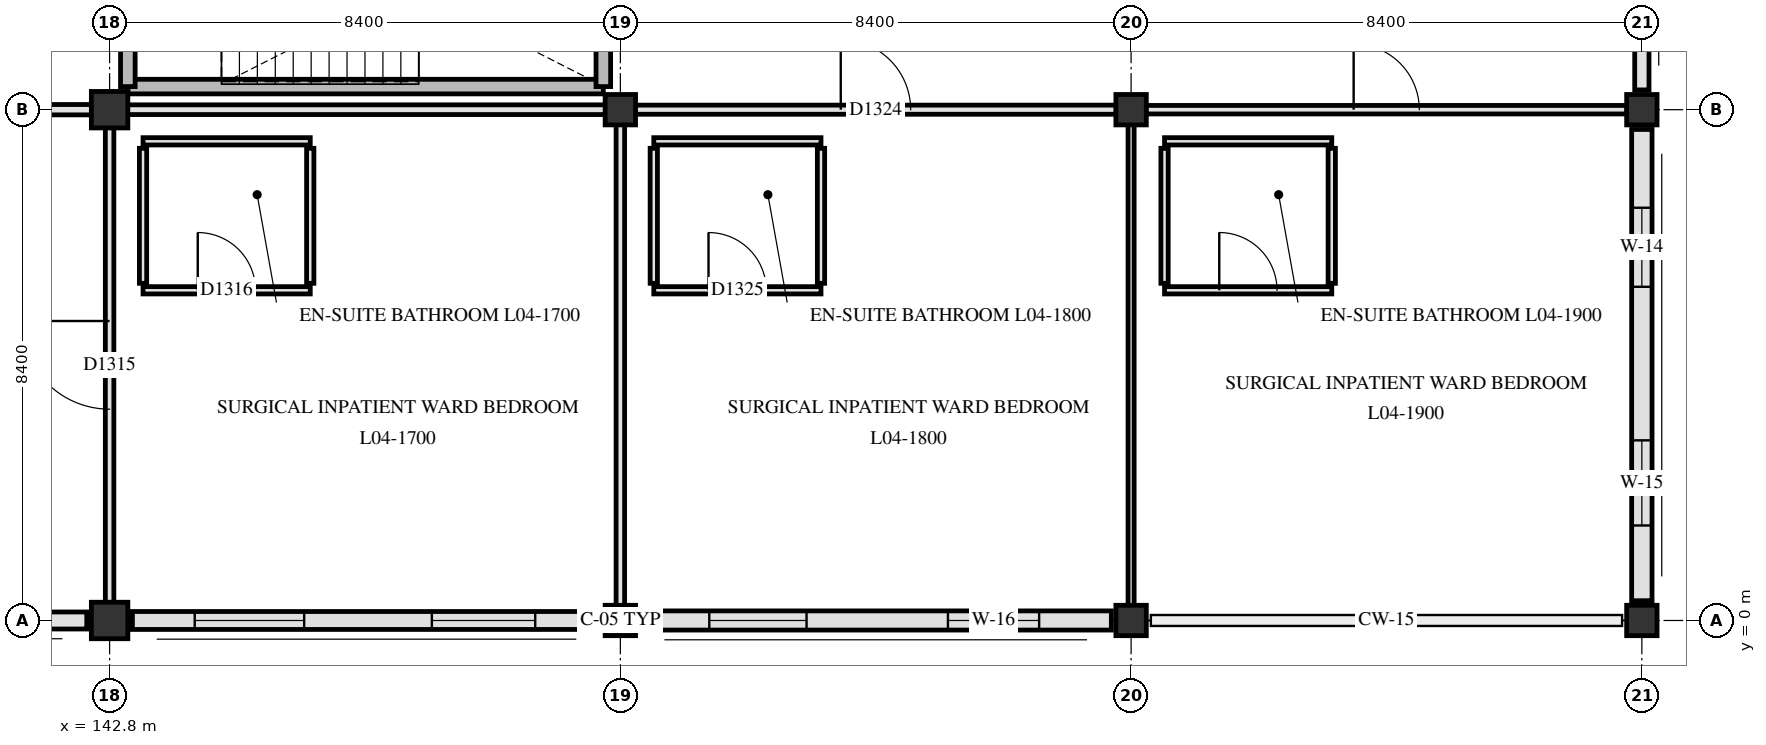
"""IFC4 building model, lengths in metres.
Left out: names, types, materials, properties, quantities, classifications, styles, units other than length and angle.
Written with IfcOpenShell. Run it as: python <this file> out.ifc"""

import sys

from ifc_helpers import new_model, si_unit, direction, frame, frame_2d, origin, origin_2d, place, context, subcontext, project, spatial, rectangle, extrude, element, fill, save


model = new_model("IFC4")
c1 = context("Model", 3, precision=1e-05, world=origin(), true_north=direction((0.0, 1.0)))
c2 = subcontext(c1, "Body", "Model", "MODEL_VIEW")
j1 = project(units=[si_unit("LENGTHUNIT", "METRE"), si_unit("PLANEANGLEUNIT", "RADIAN")], contexts=[c1])
p1 = place(None, origin())
s1 = spatial("IfcSite", under=j1, at=p1, CompositionType="ELEMENT")
p2 = place(p1, origin())
s2 = spatial("IfcBuilding", under=s1, at=p2, CompositionType="ELEMENT")
p3 = place(p2, frame((0.0, 0.0, 18.6)))
s3 = spatial("IfcBuildingStorey", under=s2, at=p3, CompositionType="ELEMENT", Elevation=18.6)
for number, where, z_axis, x_axis in (
    (1, (142.8, 0.0, 0.0), (0.0, 0.0, 1.0), (1.0, 0.0, 0.0)),
    (2, (142.8, 8.4, 0.0), (0.0, 0.0, 1.0), (1.0, 0.0, 0.0)),
):
    element("IfcColumn", number, at=place(p3, frame(where, z_axis=z_axis, x_axis=x_axis)), inside=s3, PredefinedType="COLUMN", context=c2, shape_type="SweptSolid", body=[
        extrude(rectangle(XDim=0.6, YDim=0.6, at=origin_2d()), origin(), (0.0, 0.0, 1.0), 3.9),
    ])
for number, where, z_axis, x_axis in (
    (3, (151.2, 0.0, 0.0), (0.0, 0.0, 1.0), (1.0, 0.0, 0.0)),
    (4, (151.2, 8.4, 0.0), (0.0, 0.0, 1.0), (1.0, 0.0, 0.0)),
    (5, (159.6, 0.0, 0.0), (0.0, 0.0, 1.0), (1.0, 0.0, 0.0)),
    (6, (159.6, 8.4, 0.0), (0.0, 0.0, 1.0), (1.0, 0.0, 0.0)),
    (7, (168.0, 0.0, 0.0), (0.0, 0.0, 1.0), (1.0, 0.0, 0.0)),
    (8, (168.0, 8.4, 0.0), (0.0, 0.0, 1.0), (1.0, 0.0, 0.0)),
):
    element("IfcColumn", number, at=place(p3, frame(where, z_axis=z_axis, x_axis=x_axis)), inside=s3, PredefinedType="COLUMN", context=c2, shape_type="SweptSolid", body=[
        extrude(rectangle(XDim=0.5, YDim=0.5, at=origin_2d()), origin(), (0.0, 0.0, 1.0), 3.9),
    ])
p4 = place(p3, frame((168.0, 16.475, 0.0), z_axis=(0.0, 0.0, 1.0), x_axis=(0.0, -1.0, 0.0)))
e9 = element("IfcWall", 9, at=p4, inside=s3, PredefinedType="SOLIDWALL", context=c2, shape_type="SweptSolid", body=[
    extrude(rectangle(XDim=7.75, YDim=0.235, at=frame_2d((3.875, 0.0))), origin(), (0.0, 0.0, 1.0), 3.37),
])
p5 = place(p4, frame((1.387, 0.0, 0.85)))
e10 = element("IfcOpeningElement", 10, at=p5, cuts=e9, PredefinedType="OPENING", context=c2, shape_type="SweptSolid", body=[
    extrude(rectangle(XDim=1.1, YDim=1.42, at=frame_2d((0.55, 0.71))), frame((0.0, 0.127, 0.0), z_axis=(0.0, -1.0, 0.0), x_axis=(1.0, 0.0, 0.0)), (0.0, 0.0, 1.0), 0.255),
])
p6 = place(p4, frame((5.212, 0.0, 0.85)))
e11 = element("IfcOpeningElement", 11, at=p6, cuts=e9, PredefinedType="OPENING", context=c2, shape_type="SweptSolid", body=[
    extrude(rectangle(XDim=1.2, YDim=1.42, at=frame_2d((0.6, 0.71))), frame((0.0, 0.127, 0.0), z_axis=(0.0, -1.0, 0.0), x_axis=(1.0, 0.0, 0.0)), (0.0, 0.0, 1.0), 0.255),
])
p7 = place(p3, frame((168.0, 8.075, 0.0), z_axis=(0.0, 0.0, 1.0), x_axis=(0.0, -1.0, 0.0)))
e12 = element("IfcWall", 12, at=p7, inside=s3, PredefinedType="SOLIDWALL", context=c2, shape_type="SweptSolid", body=[
    extrude(rectangle(XDim=7.75, YDim=0.335, at=frame_2d((3.875, 0.0))), origin(), (0.0, 0.0, 1.0), 3.3),
])
p8 = place(p7, frame((1.288, 0.0, 0.85)))
e13 = element("IfcOpeningElement", 13, at=p8, cuts=e12, PredefinedType="OPENING", context=c2, shape_type="SweptSolid", body=[
    extrude(rectangle(XDim=1.3, YDim=1.42, at=frame_2d((0.65, 0.71))), frame((0.0, 0.177, 0.0), z_axis=(0.0, -1.0, 0.0), x_axis=(1.0, 0.0, 0.0)), (0.0, 0.0, 1.0), 0.355),
])
p9 = place(p7, frame((5.113, 0.0, 0.85)))
e14 = element("IfcOpeningElement", 14, at=p9, cuts=e12, PredefinedType="OPENING", context=c2, shape_type="SweptSolid", body=[
    extrude(rectangle(XDim=1.4, YDim=1.42, at=frame_2d((0.7, 0.71))), frame((0.0, 0.177, 0.0), z_axis=(0.0, -1.0, 0.0), x_axis=(1.0, 0.0, 0.0)), (0.0, 0.0, 1.0), 0.355),
])
p10 = place(p3, frame((159.275, 0.0, 0.0), z_axis=(0.0, 0.0, 1.0), x_axis=(-1.0, 0.0, 0.0)))
e15 = element("IfcWall", 15, at=p10, inside=s3, PredefinedType="SOLIDWALL", context=c2, shape_type="SweptSolid", body=[
    extrude(rectangle(XDim=7.75, YDim=0.315, at=frame_2d((3.875, 0.0))), origin(), (0.0, 0.0, 1.0), 3.3),
])
p11 = place(p10, frame((1.188, 0.0, 0.85)))
e16 = element("IfcOpeningElement", 16, at=p11, cuts=e15, PredefinedType="OPENING", context=c2, shape_type="SweptSolid", body=[
    extrude(rectangle(XDim=1.5, YDim=1.42, at=frame_2d((0.75, 0.71))), frame((0.0, 0.167, 0.0), z_axis=(0.0, -1.0, 0.0), x_axis=(1.0, 0.0, 0.0)), (0.0, 0.0, 1.0), 0.335),
])
p12 = place(p10, frame((5.012, 0.0, 0.85)))
e17 = element("IfcOpeningElement", 17, at=p12, cuts=e15, PredefinedType="OPENING", context=c2, shape_type="SweptSolid", body=[
    extrude(rectangle(XDim=1.6, YDim=1.42, at=frame_2d((0.8, 0.71))), frame((0.0, 0.167, 0.0), z_axis=(0.0, -1.0, 0.0), x_axis=(1.0, 0.0, 0.0)), (0.0, 0.0, 1.0), 0.335),
])
p13 = place(p3, frame((150.875, 0.0, 0.0), z_axis=(0.0, 0.0, 1.0), x_axis=(-1.0, 0.0, 0.0)))
e18 = element("IfcWall", 18, at=p13, inside=s3, PredefinedType="SOLIDWALL", context=c2, shape_type="SweptSolid", body=[
    extrude(rectangle(XDim=7.7, YDim=0.295, at=frame_2d((3.85, 0.0))), origin(), (0.0, 0.0, 1.0), 3.31),
])
p14 = place(p13, frame((1.075, 0.0, 0.85)))
e19 = element("IfcOpeningElement", 19, at=p14, cuts=e18, PredefinedType="OPENING", context=c2, shape_type="SweptSolid", body=[
    extrude(rectangle(XDim=1.7, YDim=1.42, at=frame_2d((0.85, 0.71))), frame((0.0, 0.157, 0.0), z_axis=(0.0, -1.0, 0.0), x_axis=(1.0, 0.0, 0.0)), (0.0, 0.0, 1.0), 0.315),
])
p15 = place(p13, frame((4.875, 0.0, 0.85)))
e20 = element("IfcOpeningElement", 20, at=p15, cuts=e18, PredefinedType="OPENING", context=c2, shape_type="SweptSolid", body=[
    extrude(rectangle(XDim=1.8, YDim=1.42, at=frame_2d((0.9, 0.71))), frame((0.0, 0.157, 0.0), z_axis=(0.0, -1.0, 0.0), x_axis=(1.0, 0.0, 0.0)), (0.0, 0.0, 1.0), 0.315),
])
p16 = place(p3, frame((142.425, 0.0, 0.0), z_axis=(0.0, 0.0, 1.0), x_axis=(-1.0, 0.0, 0.0)))
e21 = element("IfcWall", 21, at=p16, inside=s3, PredefinedType="SOLIDWALL", context=c2, shape_type="SweptSolid", body=[
    extrude(rectangle(XDim=7.65, YDim=0.28, at=frame_2d((3.825, 0.0))), origin(), (0.0, 0.0, 1.0), 3.31),
])
p17 = place(p16, frame((0.962, 0.0, 0.85)))
e22 = element("IfcOpeningElement", 22, at=p17, cuts=e21, PredefinedType="OPENING", context=c2, shape_type="SweptSolid", body=[
    extrude(rectangle(XDim=1.9, YDim=1.42, at=frame_2d((0.95, 0.71))), frame((0.0, 0.15, 0.0), z_axis=(0.0, -1.0, 0.0), x_axis=(1.0, 0.0, 0.0)), (0.0, 0.0, 1.0), 0.3),
])
p18 = place(p16, frame((5.212, 0.0, 0.85)))
e23 = element("IfcOpeningElement", 23, at=p18, cuts=e21, PredefinedType="OPENING", context=c2, shape_type="SweptSolid", body=[
    extrude(rectangle(XDim=1.05, YDim=1.54, at=frame_2d((0.525, 0.77))), frame((0.0, 0.15, 0.0), z_axis=(0.0, -1.0, 0.0), x_axis=(1.0, 0.0, 0.0)), (0.0, 0.0, 1.0), 0.3),
])
p19 = place(p3, frame((143.1, 8.78, 0.0), z_axis=(0.0, 0.0, 1.0), x_axis=(1.0, 0.0, 0.0)))
e24 = element("IfcWall", 24, at=p19, inside=s3, PredefinedType="SHEAR", context=c2, shape_type="SweptSolid", body=[
    extrude(rectangle(XDim=7.82, YDim=0.24, at=frame_2d((3.91, 0.0))), origin(), (0.0, 0.0, 1.0), 3.62),
])
for number, where, z_axis, x_axis in (
    (25, (143.1, 8.78, 0.0), (0.0, 0.0, 1.0), (0.0, 1.0, 0.0)),
    (26, (150.92, 8.78, 0.0), (0.0, 0.0, 1.0), (0.0, 1.0, 0.0)),
):
    element("IfcWall", number, at=place(p3, frame(where, z_axis=z_axis, x_axis=x_axis)), inside=s3, PredefinedType="SHEAR", context=c2, shape_type="SweptSolid", body=[
        extrude(rectangle(XDim=3.32, YDim=0.24, at=frame_2d((1.66, 0.0))), origin(), (0.0, 0.0, 1.0), 3.62),
    ])
p20 = place(p3, frame((143.35, 5.43, 0.0), z_axis=(0.0, 0.0, 1.0), x_axis=(1.0, 0.0, 0.0)))
e27 = element("IfcWall", 27, at=p20, inside=s3, PredefinedType="PARTITIONING", context=c2, shape_type="SweptSolid", body=[
    extrude(rectangle(XDim=2.75, YDim=0.12, at=frame_2d((1.375, 0.0))), origin(), (0.0, 0.0, 1.0), 3.61),
])
p21 = place(p20, frame((0.9, 0.0, 0.0)))
e28 = element("IfcOpeningElement", 28, at=p21, cuts=e27, PredefinedType="OPENING", context=c2, shape_type="SweptSolid", body=[
    extrude(rectangle(XDim=0.95, YDim=2.1, at=frame_2d((0.475, 1.05))), frame((0.0, 0.07, 0.0), z_axis=(0.0, -1.0, 0.0), x_axis=(1.0, 0.0, 0.0)), (0.0, 0.0, 1.0), 0.14),
])
p22 = place(p3, frame((151.75, 5.43, 0.0), z_axis=(0.0, 0.0, 1.0), x_axis=(1.0, 0.0, 0.0)))
e29 = element("IfcWall", 29, at=p22, inside=s3, PredefinedType="PARTITIONING", context=c2, shape_type="SweptSolid", body=[
    extrude(rectangle(XDim=2.75, YDim=0.12, at=frame_2d((1.375, 0.0))), origin(), (0.0, 0.0, 1.0), 3.61),
])
p23 = place(p22, frame((0.9, 0.0, 0.0)))
e30 = element("IfcOpeningElement", 30, at=p23, cuts=e29, PredefinedType="OPENING", context=c2, shape_type="SweptSolid", body=[
    extrude(rectangle(XDim=0.95, YDim=2.1, at=frame_2d((0.475, 1.05))), frame((0.0, 0.07, 0.0), z_axis=(0.0, -1.0, 0.0), x_axis=(1.0, 0.0, 0.0)), (0.0, 0.0, 1.0), 0.14),
])
p24 = place(p3, frame((160.15, 5.43, 0.0), z_axis=(0.0, 0.0, 1.0), x_axis=(1.0, 0.0, 0.0)))
e31 = element("IfcWall", 31, at=p24, inside=s3, PredefinedType="PARTITIONING", context=c2, shape_type="SweptSolid", body=[
    extrude(rectangle(XDim=2.75, YDim=0.12, at=frame_2d((1.375, 0.0))), origin(), (0.0, 0.0, 1.0), 3.61),
])
p25 = place(p24, frame((0.9, 0.0, 0.0)))
e32 = element("IfcOpeningElement", 32, at=p25, cuts=e31, PredefinedType="OPENING", context=c2, shape_type="SweptSolid", body=[
    extrude(rectangle(XDim=0.95, YDim=2.1, at=frame_2d((0.475, 1.05))), frame((0.0, 0.07, 0.0), z_axis=(0.0, -1.0, 0.0), x_axis=(1.0, 0.0, 0.0)), (0.0, 0.0, 1.0), 0.14),
])
for number, where, z_axis, x_axis in (
    (33, (143.35, 7.88, 0.0), (0.0, 0.0, 1.0), (1.0, 0.0, 0.0)),
    (34, (151.75, 7.88, 0.0), (0.0, 0.0, 1.0), (1.0, 0.0, 0.0)),
    (35, (160.15, 7.88, 0.0), (0.0, 0.0, 1.0), (1.0, 0.0, 0.0)),
):
    element("IfcWall", number, at=place(p3, frame(where, z_axis=z_axis, x_axis=x_axis)), inside=s3, PredefinedType="PARTITIONING", context=c2, shape_type="SweptSolid", body=[
        extrude(rectangle(XDim=2.75, YDim=0.12, at=frame_2d((1.375, 0.0))), origin(), (0.0, 0.0, 1.0), 3.61),
    ])
p26 = place(p3, frame((137.0, 8.4, 0.0), z_axis=(0.0, 0.0, 1.0), x_axis=(1.0, 0.0, 0.0)))
e36 = element("IfcWall", 36, at=p26, inside=s3, PredefinedType="PARTITIONING", context=c2, shape_type="SweptSolid", body=[
    extrude(rectangle(XDim=5.505, YDim=0.17, at=frame_2d((2.752, 0.0))), origin(), (0.0, 0.0, 1.0), 3.16),
])
p27 = place(p26, frame((2.113, 0.0, 0.0)))
e37 = element("IfcOpeningElement", 37, at=p27, cuts=e36, PredefinedType="OPENING", context=c2, shape_type="SweptSolid", body=[
    extrude(rectangle(XDim=1.28, YDim=2.18, at=frame_2d((0.64, 1.09))), frame((0.0, 0.095, 0.0), z_axis=(0.0, -1.0, 0.0), x_axis=(1.0, 0.0, 0.0)), (0.0, 0.0, 1.0), 0.19),
])
p28 = place(p3, frame((143.095, 8.4, 0.0), z_axis=(0.0, 0.0, 1.0), x_axis=(1.0, 0.0, 0.0)))
e38 = element("IfcWall", 38, at=p28, inside=s3, PredefinedType="PARTITIONING", context=c2, shape_type="SweptSolid", body=[
    extrude(rectangle(XDim=7.86, YDim=0.16, at=frame_2d((3.93, 0.0))), origin(), (0.0, 0.0, 1.0), 3.16),
])
p29 = place(p3, frame((151.445, 8.4, 0.0), z_axis=(0.0, 0.0, 1.0), x_axis=(1.0, 0.0, 0.0)))
e39 = element("IfcWall", 39, at=p29, inside=s3, PredefinedType="PARTITIONING", context=c2, shape_type="SweptSolid", body=[
    extrude(rectangle(XDim=7.91, YDim=0.15, at=frame_2d((3.955, 0.0))), origin(), (0.0, 0.0, 1.0), 3.15),
])
p30 = place(p29, frame((3.38, 0.0, 0.0)))
e40 = element("IfcOpeningElement", 40, at=p30, cuts=e39, PredefinedType="OPENING", context=c2, shape_type="SweptSolid", body=[
    extrude(rectangle(XDim=1.15, YDim=2.15, at=frame_2d((0.575, 1.075))), frame((0.0, 0.085, 0.0), z_axis=(0.0, -1.0, 0.0), x_axis=(1.0, 0.0, 0.0)), (0.0, 0.0, 1.0), 0.17),
])
p31 = place(p3, frame((159.845, 8.4, 0.0), z_axis=(0.0, 0.0, 1.0), x_axis=(1.0, 0.0, 0.0)))
e41 = element("IfcWall", 41, at=p31, inside=s3, PredefinedType="PARTITIONING", context=c2, shape_type="SweptSolid", body=[
    extrude(rectangle(XDim=7.91, YDim=0.14, at=frame_2d((3.955, 0.0))), origin(), (0.0, 0.0, 1.0), 3.15),
])
p32 = place(p31, frame((3.415, 0.0, 0.0)))
e42 = element("IfcOpeningElement", 42, at=p32, cuts=e41, PredefinedType="OPENING", context=c2, shape_type="SweptSolid", body=[
    extrude(rectangle(XDim=1.08, YDim=2.12, at=frame_2d((0.54, 1.06))), frame((0.0, 0.08, 0.0), z_axis=(0.0, -1.0, 0.0), x_axis=(1.0, 0.0, 0.0)), (0.0, 0.0, 1.0), 0.16),
])
p33 = place(p3, frame((142.8, 0.295, 0.0), z_axis=(0.0, 0.0, 1.0), x_axis=(0.0, 1.0, 0.0)))
e43 = element("IfcWall", 43, at=p33, inside=s3, PredefinedType="PARTITIONING", context=c2, shape_type="SweptSolid", body=[
    extrude(rectangle(XDim=7.81, YDim=0.14, at=frame_2d((3.905, 0.0))), origin(), (0.0, 0.0, 1.0), 3.26),
])
p34 = place(p33, frame((3.18, 0.0, 0.0)))
e44 = element("IfcOpeningElement", 44, at=p34, cuts=e43, PredefinedType="OPENING", context=c2, shape_type="SweptSolid", body=[
    extrude(rectangle(XDim=1.45, YDim=2.2, at=frame_2d((0.725, 1.1))), frame((0.0, 0.08, 0.0), z_axis=(0.0, -1.0, 0.0), x_axis=(1.0, 0.0, 0.0)), (0.0, 0.0, 1.0), 0.16),
])
for number, where, z_axis, x_axis in (
    (45, (143.35, 5.545, 0.0), (0.0, 0.0, 1.0), (0.0, 1.0, 0.0)),
    (46, (146.1, 5.545, 0.0), (0.0, 0.0, 1.0), (0.0, 1.0, 0.0)),
):
    element("IfcWall", number, at=place(p3, frame(where, z_axis=z_axis, x_axis=x_axis)), inside=s3, PredefinedType="PARTITIONING", context=c2, shape_type="SweptSolid", body=[
        extrude(rectangle(XDim=2.22, YDim=0.12, at=frame_2d((1.11, 0.0))), origin(), (0.0, 0.0, 1.0), 3.31),
    ])
p35 = place(p3, frame((151.2, 0.245, 0.0), z_axis=(0.0, 0.0, 1.0), x_axis=(0.0, 1.0, 0.0)))
e47 = element("IfcWall", 47, at=p35, inside=s3, PredefinedType="PARTITIONING", context=c2, shape_type="SweptSolid", body=[
    extrude(rectangle(XDim=7.91, YDim=0.14, at=frame_2d((3.955, 0.0))), origin(), (0.0, 0.0, 1.0), 3.25),
])
for number, where, z_axis, x_axis in (
    (48, (151.75, 5.545, 0.0), (0.0, 0.0, 1.0), (0.0, 1.0, 0.0)),
    (49, (154.5, 5.545, 0.0), (0.0, 0.0, 1.0), (0.0, 1.0, 0.0)),
):
    element("IfcWall", number, at=place(p3, frame(where, z_axis=z_axis, x_axis=x_axis)), inside=s3, PredefinedType="PARTITIONING", context=c2, shape_type="SweptSolid", body=[
        extrude(rectangle(XDim=2.22, YDim=0.12, at=frame_2d((1.11, 0.0))), origin(), (0.0, 0.0, 1.0), 3.3),
    ])
p36 = place(p3, frame((159.6, 0.245, 0.0), z_axis=(0.0, 0.0, 1.0), x_axis=(0.0, 1.0, 0.0)))
e50 = element("IfcWall", 50, at=p36, inside=s3, PredefinedType="PARTITIONING", context=c2, shape_type="SweptSolid", body=[
    extrude(rectangle(XDim=7.91, YDim=0.1, at=frame_2d((3.955, 0.0))), origin(), (0.0, 0.0, 1.0), 3.25),
])
for number, where, z_axis, x_axis in (
    (51, (160.15, 5.545, 0.0), (0.0, 0.0, 1.0), (0.0, 1.0, 0.0)),
    (52, (162.9, 5.545, 0.0), (0.0, 0.0, 1.0), (0.0, 1.0, 0.0)),
):
    element("IfcWall", number, at=place(p3, frame(where, z_axis=z_axis, x_axis=x_axis)), inside=s3, PredefinedType="PARTITIONING", context=c2, shape_type="SweptSolid", body=[
        extrude(rectangle(XDim=2.22, YDim=0.12, at=frame_2d((1.11, 0.0))), origin(), (0.0, 0.0, 1.0), 3.3),
    ])
p37 = place(p8, origin())
e53 = element("IfcWindow", 53, at=p37, inside=s3, PartitioningType="SINGLE_PANEL", PredefinedType="WINDOW", context=c2, shape_type="SweptSolid", body=[
    extrude(rectangle(XDim=1.3, YDim=1.42, at=frame_2d((0.65, 0.71))), frame((0.0, 0.03, 0.0), z_axis=(0.0, -1.0, 0.0), x_axis=(1.0, 0.0, 0.0)), (0.0, 0.0, 1.0), 0.06),
])
fill(e13, e53)
p38 = place(p9, origin())
e54 = element("IfcWindow", 54, at=p38, inside=s3, PartitioningType="SINGLE_PANEL", PredefinedType="WINDOW", context=c2, shape_type="SweptSolid", body=[
    extrude(rectangle(XDim=1.4, YDim=1.42, at=frame_2d((0.7, 0.71))), frame((0.0, 0.03, 0.0), z_axis=(0.0, -1.0, 0.0), x_axis=(1.0, 0.0, 0.0)), (0.0, 0.0, 1.0), 0.06),
])
fill(e14, e54)
p39 = place(p11, origin())
e55 = element("IfcWindow", 55, at=p39, inside=s3, PartitioningType="SINGLE_PANEL", PredefinedType="WINDOW", context=c2, shape_type="SweptSolid", body=[
    extrude(rectangle(XDim=1.5, YDim=1.42, at=frame_2d((0.75, 0.71))), frame((0.0, 0.03, 0.0), z_axis=(0.0, -1.0, 0.0), x_axis=(1.0, 0.0, 0.0)), (0.0, 0.0, 1.0), 0.06),
])
fill(e16, e55)
p40 = place(p12, origin())
e56 = element("IfcWindow", 56, at=p40, inside=s3, PartitioningType="SINGLE_PANEL", PredefinedType="WINDOW", context=c2, shape_type="SweptSolid", body=[
    extrude(rectangle(XDim=1.6, YDim=1.42, at=frame_2d((0.8, 0.71))), frame((0.0, 0.03, 0.0), z_axis=(0.0, -1.0, 0.0), x_axis=(1.0, 0.0, 0.0)), (0.0, 0.0, 1.0), 0.06),
])
fill(e17, e56)
p41 = place(p14, origin())
e57 = element("IfcWindow", 57, at=p41, inside=s3, PartitioningType="SINGLE_PANEL", PredefinedType="WINDOW", context=c2, shape_type="SweptSolid", body=[
    extrude(rectangle(XDim=1.7, YDim=1.42, at=frame_2d((0.85, 0.71))), frame((0.0, 0.03, 0.0), z_axis=(0.0, -1.0, 0.0), x_axis=(1.0, 0.0, 0.0)), (0.0, 0.0, 1.0), 0.06),
])
fill(e19, e57)
p42 = place(p15, origin())
e58 = element("IfcWindow", 58, at=p42, inside=s3, PartitioningType="SINGLE_PANEL", PredefinedType="WINDOW", context=c2, shape_type="SweptSolid", body=[
    extrude(rectangle(XDim=1.8, YDim=1.42, at=frame_2d((0.9, 0.71))), frame((0.0, 0.03, 0.0), z_axis=(0.0, -1.0, 0.0), x_axis=(1.0, 0.0, 0.0)), (0.0, 0.0, 1.0), 0.06),
])
fill(e20, e58)
p43 = place(p34, origin())
e59 = element("IfcDoor", 59, at=p43, inside=s3, OperationType="SINGLE_SWING_RIGHT", PredefinedType="DOOR", context=c2, shape_type="SweptSolid", body=[
    extrude(rectangle(XDim=1.45, YDim=2.2, at=frame_2d((0.725, 1.1))), frame((0.0, 0.025, 0.0), z_axis=(0.0, -1.0, 0.0), x_axis=(1.0, 0.0, 0.0)), (0.0, 0.0, 1.0), 0.05),
])
fill(e44, e59)
p44 = place(p21, origin())
e60 = element("IfcDoor", 60, at=p44, inside=s3, OperationType="SINGLE_SWING_LEFT", PredefinedType="DOOR", context=c2, shape_type="SweptSolid", body=[
    extrude(rectangle(XDim=0.95, YDim=2.1, at=frame_2d((0.475, 1.05))), frame((0.0, 0.025, 0.0), z_axis=(0.0, -1.0, 0.0), x_axis=(1.0, 0.0, 0.0)), (0.0, 0.0, 1.0), 0.05),
])
fill(e28, e60)
p45 = place(p30, origin())
e61 = element("IfcDoor", 61, at=p45, inside=s3, OperationType="SINGLE_SWING_LEFT", PredefinedType="DOOR", context=c2, shape_type="SweptSolid", body=[
    extrude(rectangle(XDim=1.15, YDim=2.15, at=frame_2d((0.575, 1.075))), frame((0.0, 0.025, 0.0), z_axis=(0.0, -1.0, 0.0), x_axis=(1.0, 0.0, 0.0)), (0.0, 0.0, 1.0), 0.05),
])
fill(e40, e61)
p46 = place(p23, origin())
e62 = element("IfcDoor", 62, at=p46, inside=s3, OperationType="SINGLE_SWING_LEFT", PredefinedType="DOOR", context=c2, shape_type="SweptSolid", body=[
    extrude(rectangle(XDim=0.95, YDim=2.1, at=frame_2d((0.475, 1.05))), frame((0.0, 0.025, 0.0), z_axis=(0.0, -1.0, 0.0), x_axis=(1.0, 0.0, 0.0)), (0.0, 0.0, 1.0), 0.05),
])
fill(e30, e62)
p47 = place(p32, origin())
e63 = element("IfcDoor", 63, at=p47, inside=s3, OperationType="SINGLE_SWING_LEFT", PredefinedType="DOOR", context=c2, shape_type="SweptSolid", body=[
    extrude(rectangle(XDim=1.08, YDim=2.12, at=frame_2d((0.54, 1.06))), frame((0.0, 0.025, 0.0), z_axis=(0.0, -1.0, 0.0), x_axis=(1.0, 0.0, 0.0)), (0.0, 0.0, 1.0), 0.05),
])
fill(e42, e63)
p48 = place(p25, origin())
e64 = element("IfcDoor", 64, at=p48, inside=s3, OperationType="SINGLE_SWING_LEFT", PredefinedType="DOOR", context=c2, shape_type="SweptSolid", body=[
    extrude(rectangle(XDim=0.95, YDim=2.1, at=frame_2d((0.475, 1.05))), frame((0.0, 0.025, 0.0), z_axis=(0.0, -1.0, 0.0), x_axis=(1.0, 0.0, 0.0)), (0.0, 0.0, 1.0), 0.05),
])
fill(e32, e64)
save(model, sys.argv[1])
